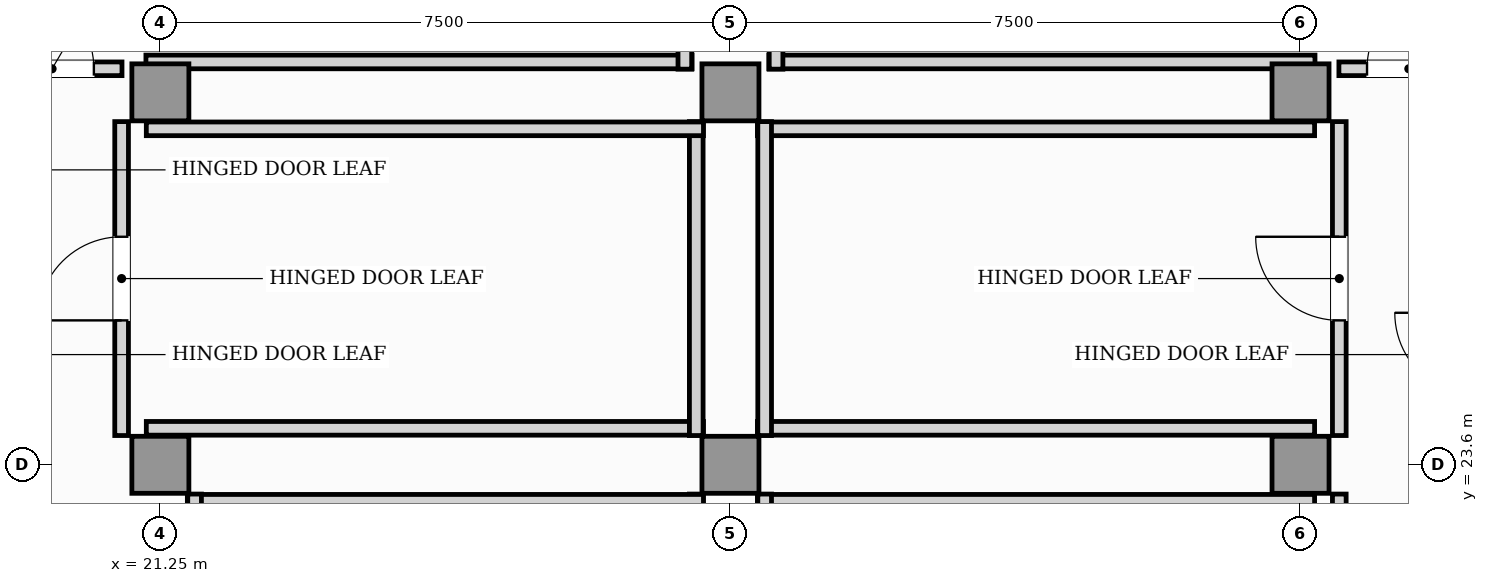
"""IFC4 building model, lengths in metres.
Left out: names, types, materials, properties, quantities, classifications, styles, units other than length and angle.
Written with IfcOpenShell. Run it as: python <this file> out.ifc"""

import sys

from ifc_helpers import new_model, si_unit, direction, frame, frame_2d, origin, origin_2d, place, context, subcontext, project, spatial, rectangle, extrude, element, fill, save


model = new_model("IFC4")
c1 = context("Model", 3, precision=1e-05, world=origin(), true_north=direction((0.0, 1.0)))
c2 = subcontext(c1, "Body", "Model", "MODEL_VIEW")
j1 = project(units=[si_unit("LENGTHUNIT", "METRE"), si_unit("PLANEANGLEUNIT", "RADIAN")], contexts=[c1])
p1 = place(None, origin())
s1 = spatial("IfcSite", under=j1, at=p1, CompositionType="ELEMENT")
p2 = place(p1, origin())
s2 = spatial("IfcBuilding", under=s1, at=p2, CompositionType="ELEMENT")
p3 = place(p2, frame((0.0, 0.0, 134.95)))
s3 = spatial("IfcBuildingStorey", under=s2, at=p3, CompositionType="ELEMENT", Elevation=134.95)
for number, where, z_axis, x_axis in (
    (1, (21.25, 23.6, 0.0), (0.0, 0.0, 1.0), (1.0, 0.0, 0.0)),
    (2, (28.75, 23.6, 0.0), (0.0, 0.0, 1.0), (1.0, 0.0, 0.0)),
    (3, (36.25, 23.6, 0.0), (0.0, 0.0, 1.0), (1.0, 0.0, 0.0)),
    (4, (21.25, 28.5, 0.0), (0.0, 0.0, 1.0), (1.0, 0.0, 0.0)),
    (5, (28.75, 28.5, 0.0), (0.0, 0.0, 1.0), (1.0, 0.0, 0.0)),
    (6, (36.25, 28.5, 0.0), (0.0, 0.0, 1.0), (1.0, 0.0, 0.0)),
):
    element("IfcColumn", number, at=place(p3, frame(where, z_axis=z_axis, x_axis=x_axis)), inside=s3, PredefinedType="COLUMN", context=c2, shape_type="SweptSolid", body=[
        extrude(rectangle(XDim=0.75, YDim=0.75, at=origin_2d()), origin(), (0.0, 0.0, 1.0), 5.2),
    ])
p4 = place(p3, frame((36.76, 13.885, 0.0), z_axis=(0.0, 0.0, 1.0), x_axis=(0.0, 1.0, 0.0)))
e7 = element("IfcWall", 7, at=p4, inside=s3, PredefinedType="PARTITIONING", context=c2, shape_type="SweptSolid", body=[
    extrude(rectangle(XDim=9.33, YDim=0.18, at=frame_2d((4.665, 0.0))), origin(), (0.0, 0.0, 1.0), 4.92),
])
p5 = place(p4, frame((4.115, 0.0, 0.0)))
e8 = element("IfcOpeningElement", 8, at=p5, cuts=e7, PredefinedType="OPENING", context=c2, shape_type="SweptSolid", body=[
    extrude(rectangle(XDim=1.1, YDim=2.2, at=frame_2d((0.55, 1.1))), frame((0.0, 0.1, 0.0), z_axis=(0.0, -1.0, 0.0), x_axis=(1.0, 0.0, 0.0)), (0.0, 0.0, 1.0), 0.2),
])
p6 = place(p3, frame((20.74, 23.985, 0.0), z_axis=(0.0, 0.0, 1.0), x_axis=(0.0, 1.0, 0.0)))
e9 = element("IfcWall", 9, at=p6, inside=s3, PredefinedType="PARTITIONING", context=c2, shape_type="SweptSolid", body=[
    extrude(rectangle(XDim=4.13, YDim=0.18, at=frame_2d((2.065, 0.0))), origin(), (0.0, 0.0, 1.0), 4.92),
])
p7 = place(p6, frame((1.515, 0.0, 0.0)))
e10 = element("IfcOpeningElement", 10, at=p7, cuts=e9, PredefinedType="OPENING", context=c2, shape_type="SweptSolid", body=[
    extrude(rectangle(XDim=1.1, YDim=2.2, at=frame_2d((0.55, 1.1))), frame((0.0, 0.1, 0.0), z_axis=(0.0, -1.0, 0.0), x_axis=(1.0, 0.0, 0.0)), (0.0, 0.0, 1.0), 0.2),
])
p8 = place(p3, frame((36.76, 23.985, 0.0), z_axis=(0.0, 0.0, 1.0), x_axis=(0.0, 1.0, 0.0)))
e11 = element("IfcWall", 11, at=p8, inside=s3, PredefinedType="PARTITIONING", context=c2, shape_type="SweptSolid", body=[
    extrude(rectangle(XDim=4.13, YDim=0.18, at=frame_2d((2.065, 0.0))), origin(), (0.0, 0.0, 1.0), 4.92),
])
p9 = place(p8, frame((1.515, 0.0, 0.0)))
e12 = element("IfcOpeningElement", 12, at=p9, cuts=e11, PredefinedType="OPENING", context=c2, shape_type="SweptSolid", body=[
    extrude(rectangle(XDim=1.1, YDim=2.2, at=frame_2d((0.55, 1.1))), frame((0.0, 0.1, 0.0), z_axis=(0.0, -1.0, 0.0), x_axis=(1.0, 0.0, 0.0)), (0.0, 0.0, 1.0), 0.2),
])
p10 = place(p3, frame((18.905, 28.81, 0.0), z_axis=(0.0, 0.0, 1.0), x_axis=(1.0, 0.0, 0.0)))
e13 = element("IfcWall", 13, at=p10, inside=s3, PredefinedType="PARTITIONING", context=c2, shape_type="SweptSolid", body=[
    extrude(rectangle(XDim=1.84, YDim=0.18, at=frame_2d((0.92, 0.0))), origin(), (0.0, 0.0, 1.0), 4.92),
])
p11 = place(p10, frame((0.37, 0.0, 0.0)))
e14 = element("IfcOpeningElement", 14, at=p11, cuts=e13, PredefinedType="OPENING", context=c2, shape_type="SweptSolid", body=[
    extrude(rectangle(XDim=1.1, YDim=2.2, at=frame_2d((0.55, 1.1))), frame((0.0, 0.1, 0.0), z_axis=(0.0, -1.0, 0.0), x_axis=(1.0, 0.0, 0.0)), (0.0, 0.0, 1.0), 0.2),
])
p12 = place(p3, frame((36.755, 28.81, 0.0), z_axis=(0.0, 0.0, 1.0), x_axis=(1.0, 0.0, 0.0)))
e15 = element("IfcWall", 15, at=p12, inside=s3, PredefinedType="PARTITIONING", context=c2, shape_type="SweptSolid", body=[
    extrude(rectangle(XDim=1.84, YDim=0.18, at=frame_2d((0.92, 0.0))), origin(), (0.0, 0.0, 1.0), 4.92),
])
p13 = place(p12, frame((0.37, 0.0, 0.0)))
e16 = element("IfcOpeningElement", 16, at=p13, cuts=e15, PredefinedType="OPENING", context=c2, shape_type="SweptSolid", body=[
    extrude(rectangle(XDim=1.1, YDim=2.2, at=frame_2d((0.55, 1.1))), frame((0.0, 0.1, 0.0), z_axis=(0.0, -1.0, 0.0), x_axis=(1.0, 0.0, 0.0)), (0.0, 0.0, 1.0), 0.2),
])
p14 = place(p3, frame((28.3, 14.215, 0.0), z_axis=(0.0, 0.0, 1.0), x_axis=(0.0, 1.0, 0.0)))
e17 = element("IfcWall", 17, at=p14, inside=s3, PredefinedType="PARTITIONING", context=c2, shape_type="SweptSolid", body=[
    extrude(rectangle(XDim=9.0, YDim=0.18, at=frame_2d((4.5, 0.0))), origin(), (0.0, 0.0, 1.0), 4.92),
])
p15 = place(p3, frame((28.395, 23.12, 0.0), z_axis=(0.0, 0.0, 1.0), x_axis=(-1.0, 0.0, 0.0)))
e18 = element("IfcWall", 18, at=p15, inside=s3, PredefinedType="PARTITIONING", context=c2, shape_type="SweptSolid", body=[
    extrude(rectangle(XDim=6.79, YDim=0.18, at=frame_2d((3.395, 0.0))), origin(), (0.0, 0.0, 1.0), 4.92),
])
p16 = place(p3, frame((21.7, 23.215, 0.0), z_axis=(0.0, 0.0, 1.0), x_axis=(0.0, -1.0, 0.0)))
e19 = element("IfcWall", 19, at=p16, inside=s3, PredefinedType="PARTITIONING", context=c2, shape_type="SweptSolid", body=[
    extrude(rectangle(XDim=9.0, YDim=0.18, at=frame_2d((4.5, 0.0))), origin(), (0.0, 0.0, 1.0), 4.92),
])
p17 = place(p3, frame((36.435, 23.12, 0.0), z_axis=(0.0, 0.0, 1.0), x_axis=(-1.0, 0.0, 0.0)))
e20 = element("IfcWall", 20, at=p17, inside=s3, PredefinedType="PARTITIONING", context=c2, shape_type="SweptSolid", body=[
    extrude(rectangle(XDim=7.33, YDim=0.18, at=frame_2d((3.665, 0.0))), origin(), (0.0, 0.0, 1.0), 4.92),
])
p18 = place(p3, frame((29.2, 23.215, 0.0), z_axis=(0.0, 0.0, 1.0), x_axis=(0.0, -1.0, 0.0)))
e21 = element("IfcWall", 21, at=p18, inside=s3, PredefinedType="PARTITIONING", context=c2, shape_type="SweptSolid", body=[
    extrude(rectangle(XDim=9.0, YDim=0.18, at=frame_2d((4.5, 0.0))), origin(), (0.0, 0.0, 1.0), 4.92),
])
p19 = place(p3, frame((21.065, 24.08, 0.0), z_axis=(0.0, 0.0, 1.0), x_axis=(1.0, 0.0, 0.0)))
e22 = element("IfcWall", 22, at=p19, inside=s3, PredefinedType="PARTITIONING", context=c2, shape_type="SweptSolid", body=[
    extrude(rectangle(XDim=7.33, YDim=0.18, at=frame_2d((3.665, 0.0))), origin(), (0.0, 0.0, 1.0), 4.92),
])
p20 = place(p3, frame((28.3, 23.985, 0.0), z_axis=(0.0, 0.0, 1.0), x_axis=(0.0, 1.0, 0.0)))
e23 = element("IfcWall", 23, at=p20, inside=s3, PredefinedType="PARTITIONING", context=c2, shape_type="SweptSolid", body=[
    extrude(rectangle(XDim=4.13, YDim=0.18, at=frame_2d((2.065, 0.0))), origin(), (0.0, 0.0, 1.0), 4.92),
])
for number, where, z_axis, x_axis in (
    (24, (28.395, 28.02, 0.0), (0.0, 0.0, 1.0), (-1.0, 0.0, 0.0)),
    (25, (29.105, 24.08, 0.0), (0.0, 0.0, 1.0), (1.0, 0.0, 0.0)),
    (26, (36.435, 28.02, 0.0), (0.0, 0.0, 1.0), (-1.0, 0.0, 0.0)),
):
    element("IfcWall", number, at=place(p3, frame(where, z_axis=z_axis, x_axis=x_axis)), inside=s3, PredefinedType="PARTITIONING", context=c2, shape_type="SweptSolid", body=[
        extrude(rectangle(XDim=7.33, YDim=0.18, at=frame_2d((3.665, 0.0))), origin(), (0.0, 0.0, 1.0), 4.92),
    ])
p21 = place(p3, frame((29.2, 28.115, 0.0), z_axis=(0.0, 0.0, 1.0), x_axis=(0.0, -1.0, 0.0)))
e27 = element("IfcWall", 27, at=p21, inside=s3, PredefinedType="PARTITIONING", context=c2, shape_type="SweptSolid", body=[
    extrude(rectangle(XDim=4.13, YDim=0.18, at=frame_2d((2.065, 0.0))), origin(), (0.0, 0.0, 1.0), 4.92),
])
p22 = place(p3, frame((21.06, 28.9, 0.0), z_axis=(0.0, 0.0, 1.0), x_axis=(1.0, 0.0, 0.0)))
e28 = element("IfcWall", 28, at=p22, inside=s3, PredefinedType="PARTITIONING", context=c2, shape_type="SweptSolid", body=[
    extrude(rectangle(XDim=7.185, YDim=0.18, at=frame_2d((3.593, 0.0))), origin(), (0.0, 0.0, 1.0), 4.92),
])
p23 = place(p3, frame((28.15, 28.805, 0.0), z_axis=(0.0, 0.0, 1.0), x_axis=(0.0, 1.0, 0.0)))
e29 = element("IfcWall", 29, at=p23, inside=s3, PredefinedType="PARTITIONING", context=c2, shape_type="SweptSolid", body=[
    extrude(rectangle(XDim=2.4, YDim=0.18, at=frame_2d((1.2, 0.0))), origin(), (0.0, 0.0, 1.0), 4.92),
])
p24 = place(p3, frame((29.255, 28.9, 0.0), z_axis=(0.0, 0.0, 1.0), x_axis=(1.0, 0.0, 0.0)))
e30 = element("IfcWall", 30, at=p24, inside=s3, PredefinedType="PARTITIONING", context=c2, shape_type="SweptSolid", body=[
    extrude(rectangle(XDim=7.185, YDim=0.18, at=frame_2d((3.593, 0.0))), origin(), (0.0, 0.0, 1.0), 4.92),
])
p25 = place(p3, frame((29.35, 31.205, 0.0), z_axis=(0.0, 0.0, 1.0), x_axis=(0.0, -1.0, 0.0)))
e31 = element("IfcWall", 31, at=p25, inside=s3, PredefinedType="PARTITIONING", context=c2, shape_type="SweptSolid", body=[
    extrude(rectangle(XDim=2.4, YDim=0.18, at=frame_2d((1.2, 0.0))), origin(), (0.0, 0.0, 1.0), 4.92),
])
p26 = place(p7, origin())
e32 = element("IfcDoor", 32, at=p26, inside=s3, OperationType="SINGLE_SWING_LEFT", PredefinedType="DOOR", context=c2, shape_type="SweptSolid", body=[
    extrude(rectangle(XDim=1.1, YDim=2.2, at=frame_2d((0.55, 1.1))), frame((0.0, 0.025, 0.0), z_axis=(0.0, -1.0, 0.0), x_axis=(1.0, 0.0, 0.0)), (0.0, 0.0, 1.0), 0.05),
])
fill(e10, e32)
p27 = place(p9, origin())
e33 = element("IfcDoor", 33, at=p27, inside=s3, OperationType="SINGLE_SWING_RIGHT", PredefinedType="DOOR", context=c2, shape_type="SweptSolid", body=[
    extrude(rectangle(XDim=1.1, YDim=2.2, at=frame_2d((0.55, 1.1))), frame((0.0, 0.025, 0.0), z_axis=(0.0, -1.0, 0.0), x_axis=(1.0, 0.0, 0.0)), (0.0, 0.0, 1.0), 0.05),
])
fill(e12, e33)
p28 = place(p11, origin())
e34 = element("IfcDoor", 34, at=p28, inside=s3, OperationType="SINGLE_SWING_LEFT", PredefinedType="DOOR", context=c2, shape_type="SweptSolid", body=[
    extrude(rectangle(XDim=1.1, YDim=2.2, at=frame_2d((0.55, 1.1))), frame((0.0, 0.025, 0.0), z_axis=(0.0, -1.0, 0.0), x_axis=(1.0, 0.0, 0.0)), (0.0, 0.0, 1.0), 0.05),
])
fill(e14, e34)
p29 = place(p13, origin())
e35 = element("IfcDoor", 35, at=p29, inside=s3, OperationType="SINGLE_SWING_RIGHT", PredefinedType="DOOR", context=c2, shape_type="SweptSolid", body=[
    extrude(rectangle(XDim=1.1, YDim=2.2, at=frame_2d((0.55, 1.1))), frame((0.0, 0.025, 0.0), z_axis=(0.0, -1.0, 0.0), x_axis=(1.0, 0.0, 0.0)), (0.0, 0.0, 1.0), 0.05),
])
fill(e16, e35)
save(model, sys.argv[1])
